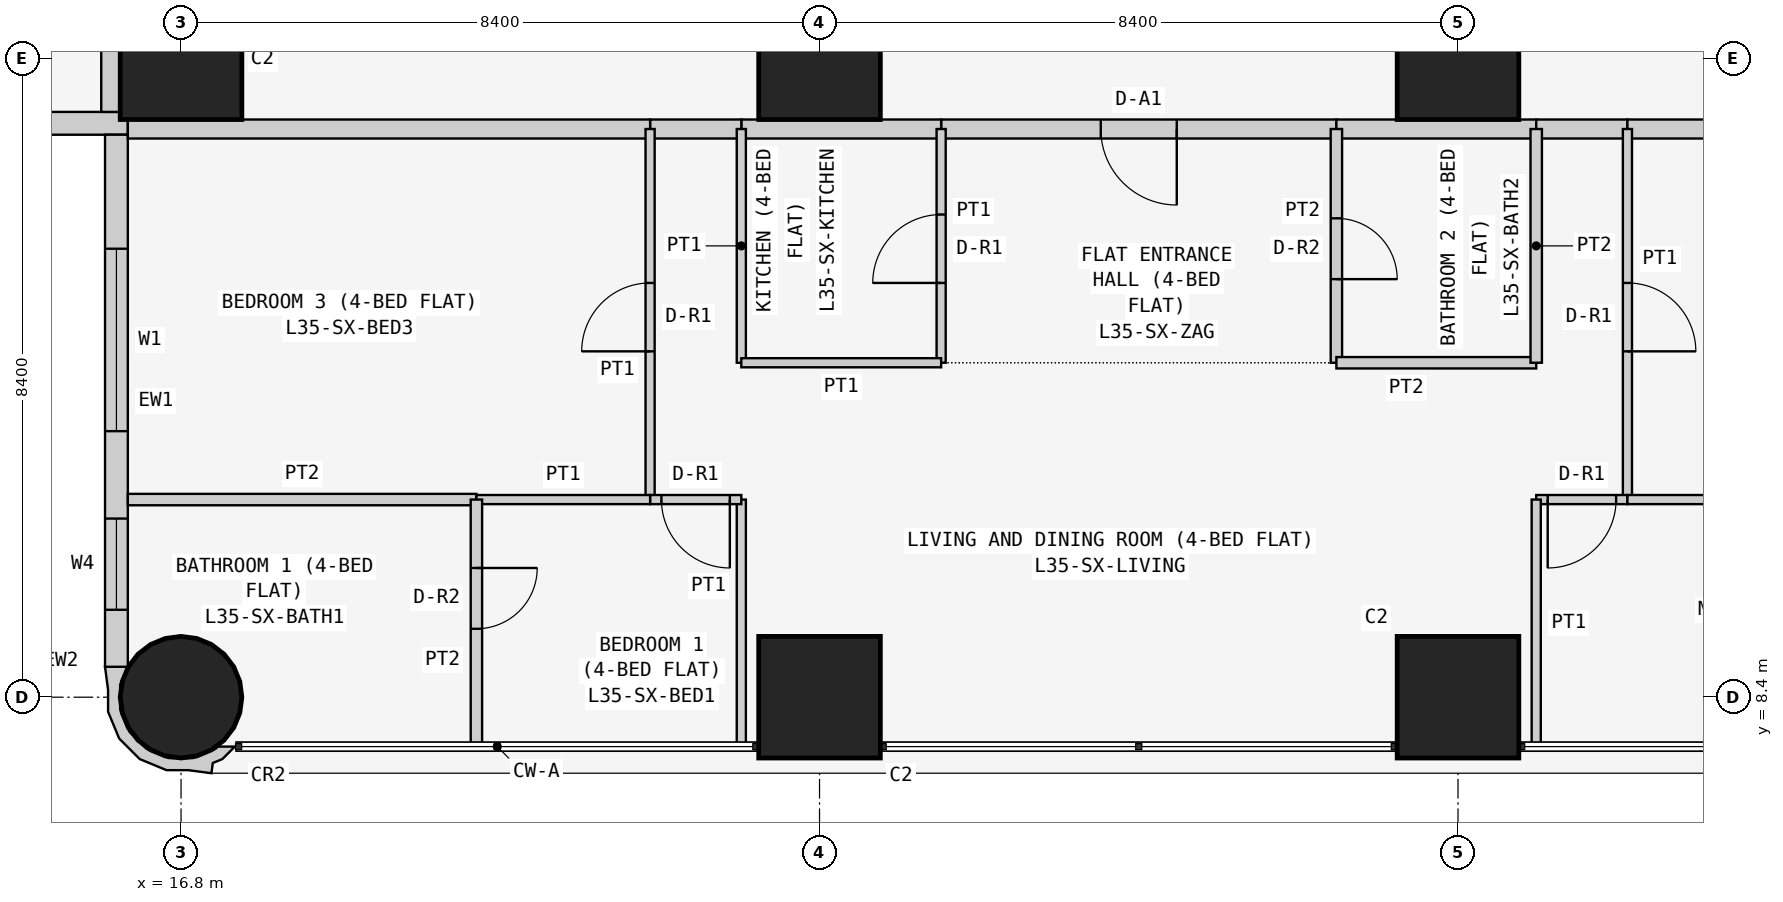
"""IFC4 building model, lengths in metres.
Left out: names, types, materials, properties, quantities, classifications, styles, units other than length and angle.
Written with IfcOpenShell. Run it as: python <this file> out.ifc"""

import sys

from ifc_helpers import new_model, si_unit, direction, frame, frame_2d, origin, origin_2d, place, context, subcontext, project, spatial, polyline, rectangle, circle, outline, extrude, element, fill, save


model = new_model("IFC4")
c1 = context("Model", 3, precision=1e-05, world=origin(), true_north=direction((0.0, 1.0)))
c2 = subcontext(c1, "Body", "Model", "MODEL_VIEW")
j1 = project(units=[si_unit("LENGTHUNIT", "METRE"), si_unit("PLANEANGLEUNIT", "RADIAN")], contexts=[c1])
p1 = place(None, origin())
s1 = spatial("IfcSite", under=j1, at=p1, CompositionType="ELEMENT")
p2 = place(p1, origin())
s2 = spatial("IfcBuilding", under=s1, at=p2, CompositionType="ELEMENT")
p3 = place(p2, frame((0.0, 0.0, 137.7)))
s3 = spatial("IfcBuildingStorey", under=s2, at=p3, CompositionType="ELEMENT", Elevation=137.7)
p4 = place(p3, frame((16.8, 8.4, 0.0), z_axis=(0.0, 0.0, 1.0), x_axis=(1.0, 0.0, 0.0)))
e1 = element("IfcColumn", 1, at=p4, inside=s3, PredefinedType="COLUMN", context=c2, shape_type="SweptSolid", body=[
    extrude(circle(Radius=0.8, at=origin_2d()), origin(), (0.0, 0.0, 1.0), 3.6),
])
for number, where, z_axis, x_axis in (
    (2, (16.8, 16.8, 0.0), (0.0, 0.0, 1.0), (1.0, 0.0, 0.0)),
    (3, (25.2, 8.4, 0.0), (0.0, 0.0, 1.0), (1.0, 0.0, 0.0)),
    (4, (25.2, 16.8, 0.0), (0.0, 0.0, 1.0), (1.0, 0.0, 0.0)),
    (5, (33.6, 8.4, 0.0), (0.0, 0.0, 1.0), (1.0, 0.0, 0.0)),
    (6, (33.6, 16.8, 0.0), (0.0, 0.0, 1.0), (1.0, 0.0, 0.0)),
):
    element("IfcColumn", number, at=place(p3, frame(where, z_axis=z_axis, x_axis=x_axis)), inside=s3, PredefinedType="COLUMN", context=c2, shape_type="SweptSolid", body=[
        extrude(rectangle(XDim=1.6, YDim=1.6, at=origin_2d()), origin(), (0.0, 0.0, 1.0), 3.6),
    ])
p5 = place(p3, frame((0.4, 15.95, 0.0), z_axis=(0.0, 0.0, 1.0), x_axis=(1.0, 0.0, 0.0)))
e7 = element("IfcWall", 7, at=p5, inside=s3, PredefinedType="SOLIDWALL", context=c2, shape_type="SweptSolid", body=[
    extrude(rectangle(XDim=15.7, YDim=0.3, at=frame_2d((7.85, 0.0))), origin(), (0.0, 0.0, 1.0), 3.45),
])
p6 = place(p5, frame((12.4, 0.0, 0.9)))
e8 = element("IfcOpeningElement", 8, at=p6, cuts=e7, PredefinedType="OPENING", context=c2, shape_type="SweptSolid", body=[
    extrude(rectangle(XDim=1.8, YDim=1.5, at=frame_2d((0.9, 0.75))), frame((0.0, 0.16, 0.0), z_axis=(0.0, -1.0, 0.0), x_axis=(1.0, 0.0, 0.0)), (0.0, 0.0, 1.0), 0.32),
])
p7 = place(p5, frame((9.55, 0.0, 1.5)))
e9 = element("IfcOpeningElement", 9, at=p7, cuts=e7, PredefinedType="OPENING", context=c2, shape_type="SweptSolid", body=[
    extrude(rectangle(XDim=0.9, YDim=0.7, at=frame_2d((0.45, 0.35))), frame((0.0, 0.16, 0.0), z_axis=(0.0, -1.0, 0.0), x_axis=(1.0, 0.0, 0.0)), (0.0, 0.0, 1.0), 0.32),
])
p8 = place(p5, frame((5.1, 0.0, 0.9)))
e10 = element("IfcOpeningElement", 10, at=p8, cuts=e7, PredefinedType="OPENING", context=c2, shape_type="SweptSolid", body=[
    extrude(rectangle(XDim=1.8, YDim=1.5, at=frame_2d((0.9, 0.75))), frame((0.0, 0.16, 0.0), z_axis=(0.0, -1.0, 0.0), x_axis=(1.0, 0.0, 0.0)), (0.0, 0.0, 1.0), 0.32),
])
p9 = place(p5, frame((2.0, 0.0, 0.0)))
e11 = element("IfcOpeningElement", 11, at=p9, cuts=e7, PredefinedType="OPENING", context=c2, shape_type="SweptSolid", body=[
    extrude(rectangle(XDim=0.9, YDim=2.4, at=frame_2d((0.45, 1.2))), frame((0.0, 0.16, 0.0), z_axis=(0.0, -1.0, 0.0), x_axis=(1.0, 0.0, 0.0)), (0.0, 0.0, 1.0), 0.32),
])
p10 = place(p5, frame((0.7, 0.0, 0.9)))
e12 = element("IfcOpeningElement", 12, at=p10, cuts=e7, PredefinedType="OPENING", context=c2, shape_type="SweptSolid", body=[
    extrude(rectangle(XDim=1.2, YDim=1.5, at=frame_2d((0.6, 0.75))), frame((0.0, 0.16, 0.0), z_axis=(0.0, -1.0, 0.0), x_axis=(1.0, 0.0, 0.0)), (0.0, 0.0, 1.0), 0.32),
])
p11 = place(p3, frame((15.95, 15.8, 0.0), z_axis=(0.0, 0.0, 1.0), x_axis=(0.0, -1.0, 0.0)))
e13 = element("IfcWall", 13, at=p11, inside=s3, PredefinedType="SOLIDWALL", context=c2, shape_type="SweptSolid", body=[
    extrude(rectangle(XDim=7.0, YDim=0.3, at=frame_2d((3.5, 0.0))), origin(), (0.0, 0.0, 1.0), 3.45),
])
p12 = place(p11, frame((1.5, 0.0, 0.9)))
e14 = element("IfcOpeningElement", 14, at=p12, cuts=e13, PredefinedType="OPENING", context=c2, shape_type="SweptSolid", body=[
    extrude(rectangle(XDim=2.4, YDim=1.5, at=frame_2d((1.2, 0.75))), frame((0.0, 0.16, 0.0), z_axis=(0.0, -1.0, 0.0), x_axis=(1.0, 0.0, 0.0)), (0.0, 0.0, 1.0), 0.32),
])
p13 = place(p11, frame((5.05, 0.0, 0.9)))
e15 = element("IfcOpeningElement", 15, at=p13, cuts=e13, PredefinedType="OPENING", context=c2, shape_type="SweptSolid", body=[
    extrude(rectangle(XDim=1.2, YDim=1.5, at=frame_2d((0.6, 0.75))), frame((0.0, 0.16, 0.0), z_axis=(0.0, -1.0, 0.0), x_axis=(1.0, 0.0, 0.0)), (0.0, 0.0, 1.0), 0.32),
])
p14 = place(p3, frame((15.983, 8.727, 0.0), z_axis=(0.0, 0.0, 1.0), x_axis=(-0.343276641956, -0.93923434088, 0.0)))
e16 = element("IfcWall", 16, at=p14, inside=s3, PredefinedType="SOLIDWALL", context=c2, shape_type="SweptSolid", body=[
    extrude(outline(polyline([(0.829, 1.599), (0.697, 1.569), (0.604, 1.67), (0.394, 1.767), (0.471, 1.556), (0.509, 1.539), (0.724, 1.304), (0.833, 1.005), (0.82, 0.686), (0.686, 0.397), (0.451, 0.182), (0.152, 0.073), (-0.116, 0.084), (-0.127, 0.078), (-0.146, 0.071), (-0.006, -0.197), (0.266, -0.055), (0.535, 0.044), (0.817, 0.302), (0.978, 0.648), (0.994, 1.03), (0.895, 1.3), (0.829, 1.599)])), origin(), (0.0, 0.0, 1.0), 3.45),
])
p15 = place(p3, frame((32.0, 15.875, 0.0), z_axis=(0.0, 0.0, 1.0), x_axis=(-1.0, 0.0, 0.0)))
e17 = element("IfcWall", 17, at=p15, inside=s3, PredefinedType="PARTITIONING", context=c2, shape_type="SweptSolid", body=[
    extrude(rectangle(XDim=5.2, YDim=0.25, at=frame_2d((2.6, 0.0))), origin(), (0.0, 0.0, 1.0), 3.45),
])
p16 = place(p15, frame((2.1, 0.0, 0.0)))
e18 = element("IfcOpeningElement", 18, at=p16, cuts=e17, PredefinedType="OPENING", context=c2, shape_type="SweptSolid", body=[
    extrude(rectangle(XDim=1.0, YDim=2.1, at=frame_2d((0.5, 1.05))), frame((0.0, 0.135, 0.0), z_axis=(0.0, -1.0, 0.0), x_axis=(1.0, 0.0, 0.0)), (0.0, 0.0, 1.0), 0.27),
])
p17 = place(p3, frame((34.629, 15.875, 0.0), z_axis=(0.0, 0.0, 1.0), x_axis=(-1.0, 0.0, 0.0)))
e19 = element("IfcWall", 19, at=p17, inside=s3, PredefinedType="PARTITIONING", context=c2, shape_type="SweptSolid", body=[
    extrude(rectangle(XDim=2.629, YDim=0.25, at=frame_2d((1.314, 0.0))), origin(), (0.0, 0.0, 1.0), 3.45),
])
p18 = place(p3, frame((26.8, 15.875, 0.0), z_axis=(0.0, 0.0, 1.0), x_axis=(-1.0, 0.0, 0.0)))
e20 = element("IfcWall", 20, at=p18, inside=s3, PredefinedType="PARTITIONING", context=c2, shape_type="SweptSolid", body=[
    extrude(rectangle(XDim=2.629, YDim=0.25, at=frame_2d((1.314, 0.0))), origin(), (0.0, 0.0, 1.0), 3.45),
])
p19 = place(p3, frame((24.171, 15.875, 0.0), z_axis=(0.0, 0.0, 1.0), x_axis=(-1.0, 0.0, 0.0)))
e21 = element("IfcWall", 21, at=p19, inside=s3, PredefinedType="PARTITIONING", context=c2, shape_type="SweptSolid", body=[
    extrude(rectangle(XDim=1.2, YDim=0.25, at=frame_2d((0.6, 0.0))), origin(), (0.0, 0.0, 1.0), 3.45),
])
p20 = place(p3, frame((35.829, 15.875, 0.0), z_axis=(0.0, 0.0, 1.0), x_axis=(-1.0, 0.0, 0.0)))
e22 = element("IfcWall", 22, at=p20, inside=s3, PredefinedType="PARTITIONING", context=c2, shape_type="SweptSolid", body=[
    extrude(rectangle(XDim=1.2, YDim=0.25, at=frame_2d((0.6, 0.0))), origin(), (0.0, 0.0, 1.0), 3.45),
])
for number, where, z_axis, x_axis in (
    (23, (42.7, 15.875, 0.0), (0.0, 0.0, 1.0), (-1.0, 0.0, 0.0)),
    (24, (22.971, 15.875, 0.0), (0.0, 0.0, 1.0), (-1.0, 0.0, 0.0)),
):
    element("IfcWall", number, at=place(p3, frame(where, z_axis=z_axis, x_axis=x_axis)), inside=s3, PredefinedType="PARTITIONING", context=c2, shape_type="SweptSolid", body=[
        extrude(rectangle(XDim=6.871, YDim=0.25, at=frame_2d((3.436, 0.0))), origin(), (0.0, 0.0, 1.0), 3.45),
    ])
p21 = place(p3, frame((15.875, 16.1, 0.0), z_axis=(0.0, 0.0, 1.0), x_axis=(0.0, 1.0, 0.0)))
e25 = element("IfcWall", 25, at=p21, inside=s3, PredefinedType="PARTITIONING", context=c2, shape_type="SweptSolid", body=[
    extrude(rectangle(XDim=6.471, YDim=0.25, at=frame_2d((3.235, 0.0))), origin(), (0.0, 0.0, 1.0), 3.45),
])
p22 = place(p3, frame((32.0, 12.8, 0.0), z_axis=(0.0, 0.0, 1.0), x_axis=(0.0, 1.0, 0.0)))
e26 = element("IfcWall", 26, at=p22, inside=s3, PredefinedType="PARTITIONING", context=c2, shape_type="SweptSolid", body=[
    extrude(rectangle(XDim=3.075, YDim=0.15, at=frame_2d((1.538, 0.0))), origin(), (0.0, 0.0, 1.0), 3.45),
])
p23 = place(p22, frame((1.1, 0.0, 0.0)))
e27 = element("IfcOpeningElement", 27, at=p23, cuts=e26, PredefinedType="OPENING", context=c2, shape_type="SweptSolid", body=[
    extrude(rectangle(XDim=0.8, YDim=2.1, at=frame_2d((0.4, 1.05))), frame((0.0, 0.085, 0.0), z_axis=(0.0, -1.0, 0.0), x_axis=(1.0, 0.0, 0.0)), (0.0, 0.0, 1.0), 0.17),
])
p24 = place(p3, frame((26.8, 15.875, 0.0), z_axis=(0.0, 0.0, 1.0), x_axis=(0.0, -1.0, 0.0)))
e28 = element("IfcWall", 28, at=p24, inside=s3, PredefinedType="PARTITIONING", context=c2, shape_type="SweptSolid", body=[
    extrude(rectangle(XDim=3.075, YDim=0.12, at=frame_2d((1.538, 0.0))), origin(), (0.0, 0.0, 1.0), 3.45),
])
p25 = place(p24, frame((1.125, 0.0, 0.0)))
e29 = element("IfcOpeningElement", 29, at=p25, cuts=e28, PredefinedType="OPENING", context=c2, shape_type="SweptSolid", body=[
    extrude(rectangle(XDim=0.9, YDim=2.1, at=frame_2d((0.45, 1.05))), frame((0.0, 0.07, 0.0), z_axis=(0.0, -1.0, 0.0), x_axis=(1.0, 0.0, 0.0)), (0.0, 0.0, 1.0), 0.14),
])
p26 = place(p3, frame((32.0, 12.8, 0.0), z_axis=(0.0, 0.0, 1.0), x_axis=(1.0, 0.0, 0.0)))
e30 = element("IfcWall", 30, at=p26, inside=s3, PredefinedType="PARTITIONING", context=c2, shape_type="SweptSolid", body=[
    extrude(rectangle(XDim=2.629, YDim=0.15, at=frame_2d((1.314, 0.0))), origin(), (0.0, 0.0, 1.0), 3.45),
])
p27 = place(p3, frame((34.629, 12.8, 0.0), z_axis=(0.0, 0.0, 1.0), x_axis=(0.0, 1.0, 0.0)))
e31 = element("IfcWall", 31, at=p27, inside=s3, PredefinedType="PARTITIONING", context=c2, shape_type="SweptSolid", body=[
    extrude(rectangle(XDim=3.075, YDim=0.15, at=frame_2d((1.538, 0.0))), origin(), (0.0, 0.0, 1.0), 3.45),
])
p28 = place(p3, frame((24.171, 15.875, 0.0), z_axis=(0.0, 0.0, 1.0), x_axis=(0.0, -1.0, 0.0)))
e32 = element("IfcWall", 32, at=p28, inside=s3, PredefinedType="PARTITIONING", context=c2, shape_type="SweptSolid", body=[
    extrude(rectangle(XDim=3.075, YDim=0.12, at=frame_2d((1.538, 0.0))), origin(), (0.0, 0.0, 1.0), 3.45),
])
p29 = place(p3, frame((24.171, 12.8, 0.0), z_axis=(0.0, 0.0, 1.0), x_axis=(1.0, 0.0, 0.0)))
e33 = element("IfcWall", 33, at=p29, inside=s3, PredefinedType="PARTITIONING", context=c2, shape_type="SweptSolid", body=[
    extrude(rectangle(XDim=2.629, YDim=0.12, at=frame_2d((1.314, 0.0))), origin(), (0.0, 0.0, 1.0), 3.45),
])
p30 = place(p3, frame((35.829, 15.875, 0.0), z_axis=(0.0, 0.0, 1.0), x_axis=(0.0, -1.0, 0.0)))
e34 = element("IfcWall", 34, at=p30, inside=s3, PredefinedType="PARTITIONING", context=c2, shape_type="SweptSolid", body=[
    extrude(rectangle(XDim=4.875, YDim=0.12, at=frame_2d((2.438, 0.0))), origin(), (0.0, 0.0, 1.0), 3.45),
])
p31 = place(p30, frame((2.025, 0.0, 0.0)))
e35 = element("IfcOpeningElement", 35, at=p31, cuts=e34, PredefinedType="OPENING", context=c2, shape_type="SweptSolid", body=[
    extrude(rectangle(XDim=0.9, YDim=2.1, at=frame_2d((0.45, 1.05))), frame((0.0, 0.07, 0.0), z_axis=(0.0, -1.0, 0.0), x_axis=(1.0, 0.0, 0.0)), (0.0, 0.0, 1.0), 0.14),
])
p32 = place(p3, frame((35.829, 11.0, 0.0), z_axis=(0.0, 0.0, 1.0), x_axis=(-1.0, 0.0, 0.0)))
e36 = element("IfcWall", 36, at=p32, inside=s3, PredefinedType="PARTITIONING", context=c2, shape_type="SweptSolid", body=[
    extrude(rectangle(XDim=1.2, YDim=0.12, at=frame_2d((0.6, 0.0))), origin(), (0.0, 0.0, 1.0), 3.45),
])
p33 = place(p32, frame((0.149, 0.0, 0.0)))
e37 = element("IfcOpeningElement", 37, at=p33, cuts=e36, PredefinedType="OPENING", context=c2, shape_type="SweptSolid", body=[
    extrude(rectangle(XDim=0.9, YDim=2.1, at=frame_2d((0.45, 1.05))), frame((0.0, 0.07, 0.0), z_axis=(0.0, -1.0, 0.0), x_axis=(1.0, 0.0, 0.0)), (0.0, 0.0, 1.0), 0.14),
])
p34 = place(p3, frame((34.629, 11.0, 0.0), z_axis=(0.0, 0.0, 1.0), x_axis=(0.0, -1.0, 0.0)))
e38 = element("IfcWall", 38, at=p34, inside=s3, PredefinedType="PARTITIONING", context=c2, shape_type="SweptSolid", body=[
    extrude(rectangle(XDim=3.25, YDim=0.12, at=frame_2d((1.625, 0.0))), origin(), (0.0, 0.0, 1.0), 3.45),
])
p35 = place(p3, frame((22.971, 11.0, 0.0), z_axis=(0.0, 0.0, 1.0), x_axis=(0.0, 1.0, 0.0)))
e39 = element("IfcWall", 39, at=p35, inside=s3, PredefinedType="PARTITIONING", context=c2, shape_type="SweptSolid", body=[
    extrude(rectangle(XDim=4.875, YDim=0.12, at=frame_2d((2.438, 0.0))), origin(), (0.0, 0.0, 1.0), 3.45),
])
p36 = place(p35, frame((1.95, 0.0, 0.0)))
e40 = element("IfcOpeningElement", 40, at=p36, cuts=e39, PredefinedType="OPENING", context=c2, shape_type="SweptSolid", body=[
    extrude(rectangle(XDim=0.9, YDim=2.1, at=frame_2d((0.45, 1.05))), frame((0.0, 0.07, 0.0), z_axis=(0.0, -1.0, 0.0), x_axis=(1.0, 0.0, 0.0)), (0.0, 0.0, 1.0), 0.14),
])
p37 = place(p3, frame((24.171, 7.75, 0.0), z_axis=(0.0, 0.0, 1.0), x_axis=(0.0, 1.0, 0.0)))
e41 = element("IfcWall", 41, at=p37, inside=s3, PredefinedType="PARTITIONING", context=c2, shape_type="SweptSolid", body=[
    extrude(rectangle(XDim=3.25, YDim=0.12, at=frame_2d((1.625, 0.0))), origin(), (0.0, 0.0, 1.0), 3.45),
])
p38 = place(p3, frame((24.171, 11.0, 0.0), z_axis=(0.0, 0.0, 1.0), x_axis=(-1.0, 0.0, 0.0)))
e42 = element("IfcWall", 42, at=p38, inside=s3, PredefinedType="PARTITIONING", context=c2, shape_type="SweptSolid", body=[
    extrude(rectangle(XDim=1.2, YDim=0.12, at=frame_2d((0.6, 0.0))), origin(), (0.0, 0.0, 1.0), 3.45),
])
p39 = place(p38, frame((0.151, 0.0, 0.0)))
e43 = element("IfcOpeningElement", 43, at=p39, cuts=e42, PredefinedType="OPENING", context=c2, shape_type="SweptSolid", body=[
    extrude(rectangle(XDim=0.9, YDim=2.1, at=frame_2d((0.45, 1.05))), frame((0.0, 0.07, 0.0), z_axis=(0.0, -1.0, 0.0), x_axis=(1.0, 0.0, 0.0)), (0.0, 0.0, 1.0), 0.14),
])
p40 = place(p3, frame((35.829, 11.0, 0.0), z_axis=(0.0, 0.0, 1.0), x_axis=(1.0, 0.0, 0.0)))
e44 = element("IfcWall", 44, at=p40, inside=s3, PredefinedType="PARTITIONING", context=c2, shape_type="SweptSolid", body=[
    extrude(rectangle(XDim=6.871, YDim=0.12, at=frame_2d((3.436, 0.0))), origin(), (0.0, 0.0, 1.0), 3.45),
])
p41 = place(p3, frame((16.1, 11.0, 0.0), z_axis=(0.0, 0.0, 1.0), x_axis=(1.0, 0.0, 0.0)))
e45 = element("IfcWall", 45, at=p41, inside=s3, PredefinedType="PARTITIONING", context=c2, shape_type="SweptSolid", body=[
    extrude(rectangle(XDim=4.586, YDim=0.15, at=frame_2d((2.293, 0.0))), origin(), (0.0, 0.0, 1.0), 3.45),
])
p42 = place(p3, frame((20.686, 11.0, 0.0), z_axis=(0.0, 0.0, 1.0), x_axis=(1.0, 0.0, 0.0)))
e46 = element("IfcWall", 46, at=p42, inside=s3, PredefinedType="PARTITIONING", context=c2, shape_type="SweptSolid", body=[
    extrude(rectangle(XDim=2.285, YDim=0.12, at=frame_2d((1.143, 0.0))), origin(), (0.0, 0.0, 1.0), 3.45),
])
p43 = place(p3, frame((20.686, 7.75, 0.0), z_axis=(0.0, 0.0, 1.0), x_axis=(0.0, 1.0, 0.0)))
e47 = element("IfcWall", 47, at=p43, inside=s3, PredefinedType="PARTITIONING", context=c2, shape_type="SweptSolid", body=[
    extrude(rectangle(XDim=3.25, YDim=0.15, at=frame_2d((1.625, 0.0))), origin(), (0.0, 0.0, 1.0), 3.45),
])
p44 = place(p43, frame((1.55, 0.0, 0.0)))
e48 = element("IfcOpeningElement", 48, at=p44, cuts=e47, PredefinedType="OPENING", context=c2, shape_type="SweptSolid", body=[
    extrude(rectangle(XDim=0.8, YDim=2.1, at=frame_2d((0.4, 1.05))), frame((0.0, 0.085, 0.0), z_axis=(0.0, -1.0, 0.0), x_axis=(1.0, 0.0, 0.0)), (0.0, 0.0, 1.0), 0.17),
])
p45 = place(p12, origin())
e49 = element("IfcWindow", 49, at=p45, inside=s3, PartitioningType="SINGLE_PANEL", PredefinedType="WINDOW", context=c2, shape_type="SweptSolid", body=[
    extrude(rectangle(XDim=2.4, YDim=1.5, at=frame_2d((1.2, 0.75))), frame((0.0, 0.03, 0.0), z_axis=(0.0, -1.0, 0.0), x_axis=(1.0, 0.0, 0.0)), (0.0, 0.0, 1.0), 0.06),
])
fill(e14, e49)
p46 = place(p13, origin())
e50 = element("IfcWindow", 50, at=p46, inside=s3, PartitioningType="SINGLE_PANEL", PredefinedType="WINDOW", context=c2, shape_type="SweptSolid", body=[
    extrude(rectangle(XDim=1.2, YDim=1.5, at=frame_2d((0.6, 0.75))), frame((0.0, 0.03, 0.0), z_axis=(0.0, -1.0, 0.0), x_axis=(1.0, 0.0, 0.0)), (0.0, 0.0, 1.0), 0.06),
])
fill(e15, e50)
p47 = place(p16, origin())
e51 = element("IfcDoor", 51, at=p47, inside=s3, OperationType="SINGLE_SWING_LEFT", PredefinedType="DOOR", context=c2, shape_type="SweptSolid", body=[
    extrude(rectangle(XDim=1.0, YDim=2.1, at=frame_2d((0.5, 1.05))), frame((0.0, 0.025, 0.0), z_axis=(0.0, -1.0, 0.0), x_axis=(1.0, 0.0, 0.0)), (0.0, 0.0, 1.0), 0.05),
])
fill(e18, e51)
p48 = place(p23, frame((0.8, 0.0, 0.0), z_axis=(0.0, 0.0, 1.0), x_axis=(-1.0, 0.0, 0.0)))
e52 = element("IfcDoor", 52, at=p48, inside=s3, OperationType="SINGLE_SWING_RIGHT", PredefinedType="DOOR", context=c2, shape_type="SweptSolid", body=[
    extrude(rectangle(XDim=0.8, YDim=2.1, at=frame_2d((0.4, 1.05))), frame((0.0, 0.025, 0.0), z_axis=(0.0, -1.0, 0.0), x_axis=(1.0, 0.0, 0.0)), (0.0, 0.0, 1.0), 0.05),
])
fill(e27, e52)
p49 = place(p25, frame((0.9, 0.0, 0.0), z_axis=(0.0, 0.0, 1.0), x_axis=(-1.0, 0.0, 0.0)))
e53 = element("IfcDoor", 53, at=p49, inside=s3, OperationType="SINGLE_SWING_LEFT", PredefinedType="DOOR", context=c2, shape_type="SweptSolid", body=[
    extrude(rectangle(XDim=0.9, YDim=2.1, at=frame_2d((0.45, 1.05))), frame((0.0, 0.025, 0.0), z_axis=(0.0, -1.0, 0.0), x_axis=(1.0, 0.0, 0.0)), (0.0, 0.0, 1.0), 0.05),
])
fill(e29, e53)
p50 = place(p31, origin())
e54 = element("IfcDoor", 54, at=p50, inside=s3, OperationType="SINGLE_SWING_RIGHT", PredefinedType="DOOR", context=c2, shape_type="SweptSolid", body=[
    extrude(rectangle(XDim=0.9, YDim=2.1, at=frame_2d((0.45, 1.05))), frame((0.0, 0.025, 0.0), z_axis=(0.0, -1.0, 0.0), x_axis=(1.0, 0.0, 0.0)), (0.0, 0.0, 1.0), 0.05),
])
fill(e35, e54)
p51 = place(p33, origin())
e55 = element("IfcDoor", 55, at=p51, inside=s3, OperationType="SINGLE_SWING_RIGHT", PredefinedType="DOOR", context=c2, shape_type="SweptSolid", body=[
    extrude(rectangle(XDim=0.9, YDim=2.1, at=frame_2d((0.45, 1.05))), frame((0.0, 0.025, 0.0), z_axis=(0.0, -1.0, 0.0), x_axis=(1.0, 0.0, 0.0)), (0.0, 0.0, 1.0), 0.05),
])
fill(e37, e55)
p52 = place(p36, origin())
e56 = element("IfcDoor", 56, at=p52, inside=s3, OperationType="SINGLE_SWING_LEFT", PredefinedType="DOOR", context=c2, shape_type="SweptSolid", body=[
    extrude(rectangle(XDim=0.9, YDim=2.1, at=frame_2d((0.45, 1.05))), frame((0.0, 0.025, 0.0), z_axis=(0.0, -1.0, 0.0), x_axis=(1.0, 0.0, 0.0)), (0.0, 0.0, 1.0), 0.05),
])
fill(e40, e56)
p53 = place(p39, origin())
e57 = element("IfcDoor", 57, at=p53, inside=s3, OperationType="SINGLE_SWING_LEFT", PredefinedType="DOOR", context=c2, shape_type="SweptSolid", body=[
    extrude(rectangle(XDim=0.9, YDim=2.1, at=frame_2d((0.45, 1.05))), frame((0.0, 0.025, 0.0), z_axis=(0.0, -1.0, 0.0), x_axis=(1.0, 0.0, 0.0)), (0.0, 0.0, 1.0), 0.05),
])
fill(e43, e57)
p54 = place(p44, frame((0.8, 0.0, 0.0), z_axis=(0.0, 0.0, 1.0), x_axis=(-1.0, 0.0, 0.0)))
e58 = element("IfcDoor", 58, at=p54, inside=s3, OperationType="SINGLE_SWING_LEFT", PredefinedType="DOOR", context=c2, shape_type="SweptSolid", body=[
    extrude(rectangle(XDim=0.8, YDim=2.1, at=frame_2d((0.4, 1.05))), frame((0.0, 0.025, 0.0), z_axis=(0.0, -1.0, 0.0), x_axis=(1.0, 0.0, 0.0)), (0.0, 0.0, 1.0), 0.05),
])
fill(e48, e58)
save(model, sys.argv[1])
